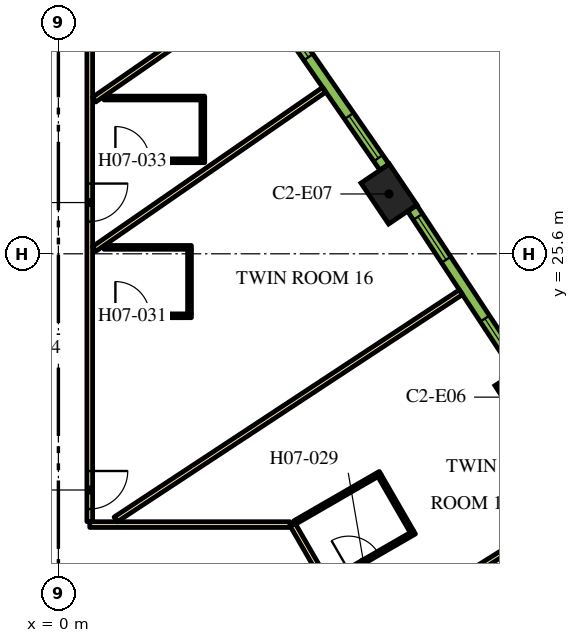
"""IFC4 building model, lengths in metres.
Left out: names, types, materials, properties, quantities, classifications, styles, units other than length and angle.
Written with IfcOpenShell. Run it as: python <this file> out.ifc"""

import sys

from ifc_helpers import new_model, si_unit, direction, frame, frame_2d, origin, origin_2d, place, context, subcontext, project, spatial, rectangle, extrude, element, fill, save


model = new_model("IFC4")
c1 = context("Model", 3, precision=1e-05, world=origin(), true_north=direction((0.0, 1.0)))
c2 = subcontext(c1, "Body", "Model", "MODEL_VIEW")
j1 = project(units=[si_unit("LENGTHUNIT", "METRE"), si_unit("PLANEANGLEUNIT", "RADIAN")], contexts=[c1])
p1 = place(None, origin())
s1 = spatial("IfcSite", under=j1, at=p1, CompositionType="ELEMENT")
p2 = place(p1, origin())
s2 = spatial("IfcBuilding", under=s1, at=p2, CompositionType="ELEMENT")
p3 = place(p2, frame((0.0, 0.0, 99.3)))
s3 = spatial("IfcBuildingStorey", under=s2, at=p3, CompositionType="ELEMENT", Elevation=99.3)
for number, where, z_axis, x_axis in (
    (1, (12.217, 21.828, 0.0), (0.0, 0.0, 1.0), (-0.54, 0.842, 0.0)),
    (2, (8.699, 27.174, 0.0), (0.0, 0.0, 1.0), (-0.559, 0.829, 0.0)),
):
    element("IfcColumn", number, at=place(p3, frame(where, z_axis=z_axis, x_axis=x_axis)), inside=s3, PredefinedType="COLUMN", context=c2, shape_type="SweptSolid", body=[
        extrude(rectangle(XDim=1.3, YDim=0.9, at=origin_2d()), origin(), (0.0, 0.0, 1.0), 3.9),
    ])
p4 = place(p3, frame((6.163, 18.475, 0.0), z_axis=(0.0, 0.0, 1.0), x_axis=(0.500001317485, -0.866024643133, 0.0)))
e3 = element("IfcWall", 3, at=p4, inside=s3, PredefinedType="PARTITIONING", context=c2, shape_type="SweptSolid", body=[
    extrude(rectangle(XDim=25.767, YDim=0.15, at=frame_2d((12.883, 0.0))), origin(), (0.0, 0.0, 1.0), 2.75),
])
p5 = place(p4, frame((24.241, 0.0, 0.0)))
e4 = element("IfcOpeningElement", 4, at=p5, cuts=e3, PredefinedType="OPENING", context=c2, shape_type="SweptSolid", body=[
    extrude(rectangle(XDim=1.0, YDim=2.1, at=frame_2d((0.5, 1.05))), frame((0.0, 0.085, 0.0), z_axis=(0.0, -1.0, 0.0), x_axis=(1.0, 0.0, 0.0)), (0.0, 0.0, 1.0), 0.17),
])
p6 = place(p4, frame((13.144, 0.0, 0.0)))
e5 = element("IfcOpeningElement", 5, at=p6, cuts=e3, PredefinedType="OPENING", context=c2, shape_type="SweptSolid", body=[
    extrude(rectangle(XDim=1.0, YDim=2.1, at=frame_2d((0.5, 1.05))), frame((0.0, 0.085, 0.0), z_axis=(0.0, -1.0, 0.0), x_axis=(1.0, 0.0, 0.0)), (0.0, 0.0, 1.0), 0.17),
])
p7 = place(p4, frame((11.592, 0.0, 0.0)))
e6 = element("IfcOpeningElement", 6, at=p7, cuts=e3, PredefinedType="OPENING", context=c2, shape_type="SweptSolid", body=[
    extrude(rectangle(XDim=1.1, YDim=2.1, at=frame_2d((0.55, 1.05))), frame((0.0, 0.085, 0.0), z_axis=(0.0, -1.0, 0.0), x_axis=(1.0, 0.0, 0.0)), (0.0, 0.0, 1.0), 0.17),
])
p8 = place(p4, frame((4.674, 0.0, 0.0)))
e7 = element("IfcOpeningElement", 7, at=p8, cuts=e3, PredefinedType="OPENING", context=c2, shape_type="SweptSolid", body=[
    extrude(rectangle(XDim=0.9, YDim=2.1, at=frame_2d((0.45, 1.05))), frame((0.0, 0.085, 0.0), z_axis=(0.0, -1.0, 0.0), x_axis=(1.0, 0.0, 0.0)), (0.0, 0.0, 1.0), 0.17),
])
p9 = place(p4, frame((2.411, 0.0, 0.0)))
e8 = element("IfcOpeningElement", 8, at=p9, cuts=e3, PredefinedType="OPENING", context=c2, shape_type="SweptSolid", body=[
    extrude(rectangle(XDim=1.0, YDim=2.1, at=frame_2d((0.5, 1.05))), frame((0.0, 0.085, 0.0), z_axis=(0.0, -1.0, 0.0), x_axis=(1.0, 0.0, 0.0)), (0.0, 0.0, 1.0), 0.17),
])
p10 = place(p3, frame((0.825, 18.475, 0.0), z_axis=(0.0, 0.0, 1.0), x_axis=(1.0, 0.0, 0.0)))
e9 = element("IfcWall", 9, at=p10, inside=s3, PredefinedType="PARTITIONING", context=c2, shape_type="SweptSolid", body=[
    extrude(rectangle(XDim=5.268, YDim=0.15, at=frame_2d((2.634, 0.0))), origin(), (0.0, 0.0, 1.0), 2.75),
])
p11 = place(p3, frame((0.825, 32.098, 0.0), z_axis=(0.0, 0.0, 1.0), x_axis=(0.0, -1.0, 0.0)))
e10 = element("IfcWall", 10, at=p11, inside=s3, PredefinedType="PARTITIONING", context=c2, shape_type="SweptSolid", body=[
    extrude(rectangle(XDim=13.543, YDim=0.15, at=frame_2d((6.772, 0.0))), origin(), (0.0, 0.0, 1.0), 2.75),
])
p12 = place(p11, frame((12.213, 0.0, 0.0)))
e11 = element("IfcOpeningElement", 11, at=p12, cuts=e10, PredefinedType="OPENING", context=c2, shape_type="SweptSolid", body=[
    extrude(rectangle(XDim=1.0, YDim=2.1, at=frame_2d((0.5, 1.05))), frame((0.0, 0.085, 0.0), z_axis=(0.0, -1.0, 0.0), x_axis=(1.0, 0.0, 0.0)), (0.0, 0.0, 1.0), 0.17),
])
p13 = place(p11, frame((4.65, 0.0, 0.0)))
e12 = element("IfcOpeningElement", 12, at=p13, cuts=e10, PredefinedType="OPENING", context=c2, shape_type="SweptSolid", body=[
    extrude(rectangle(XDim=1.0, YDim=2.1, at=frame_2d((0.5, 1.05))), frame((0.0, 0.085, 0.0), z_axis=(0.0, -1.0, 0.0), x_axis=(1.0, 0.0, 0.0)), (0.0, 0.0, 1.0), 0.17),
])
p14 = place(p3, frame((6.994, 29.917, 0.0), z_axis=(0.0, 0.0, 1.0), x_axis=(-0.822255462494, -0.569118576747, 0.0)))
e13 = element("IfcWall", 13, at=p14, inside=s3, PredefinedType="PARTITIONING", context=c2, shape_type="SweptSolid", body=[
    extrude(rectangle(XDim=7.362, YDim=0.15, at=frame_2d((3.681, 0.0))), origin(), (0.0, 0.0, 1.0), 2.75),
])
p15 = place(p3, frame((10.592, 24.589, 0.0), z_axis=(0.0, 0.0, 1.0), x_axis=(-0.835337323748, -0.549737715236, 0.0)))
e14 = element("IfcWall", 14, at=p15, inside=s3, PredefinedType="PARTITIONING", context=c2, shape_type="SweptSolid", body=[
    extrude(rectangle(XDim=10.875, YDim=0.15, at=frame_2d((5.438, 0.0))), origin(), (0.0, 0.0, 1.0), 2.75),
])
p16 = place(p3, frame((4.649, 32.223, 0.0), z_axis=(0.0, 0.0, 1.0), x_axis=(-0.822262349475, -0.569108626394, 0.0)))
e15 = element("IfcWall", 15, at=p16, inside=s3, PredefinedType="PARTITIONING", context=c2, shape_type="SweptSolid", body=[
    extrude(rectangle(XDim=4.51, YDim=0.15, at=frame_2d((2.255, 0.0))), origin(), (0.0, 0.0, 1.0), 2.75),
])
p17 = place(p3, frame((14.049, 19.2, 0.0), z_axis=(0.0, 0.0, 1.0), x_axis=(-0.847955867271, -0.530066832731, 0.0)))
e16 = element("IfcWall", 16, at=p17, inside=s3, PredefinedType="PARTITIONING", context=c2, shape_type="SweptSolid", body=[
    extrude(rectangle(XDim=7.111, YDim=0.15, at=frame_2d((3.556, 0.0))), origin(), (0.0, 0.0, 1.0), 2.75),
])
p18 = place(p3, frame((7.118, 16.971, 0.0), z_axis=(0.0, 0.0, 1.0), x_axis=(0.866021400173, 0.500006934395, 0.0)))
e17 = element("IfcWall", 17, at=p18, inside=s3, PredefinedType="PARTITIONING", context=c2, shape_type="SweptSolid", body=[
    extrude(rectangle(XDim=2.6, YDim=0.1, at=frame_2d((1.3, 0.0))), origin(), (0.0, 0.0, 1.0), 2.75),
])
p19 = place(p18, frame((0.6, 0.0, 0.0)))
e18 = element("IfcOpeningElement", 18, at=p19, cuts=e17, PredefinedType="OPENING", context=c2, shape_type="SweptSolid", body=[
    extrude(rectangle(XDim=0.9, YDim=2.1, at=frame_2d((0.45, 1.05))), frame((0.0, 0.06, 0.0), z_axis=(0.0, -1.0, 0.0), x_axis=(1.0, 0.0, 0.0)), (0.0, 0.0, 1.0), 0.12),
])
p20 = place(p3, frame((9.302, 18.289, 0.0), z_axis=(0.0, 0.0, 1.0), x_axis=(-0.500062241894, 0.865989465428, 0.0)))
e19 = element("IfcWall", 19, at=p20, inside=s3, PredefinedType="PARTITIONING", context=c2, shape_type="SweptSolid", body=[
    extrude(rectangle(XDim=1.7, YDim=0.1, at=frame_2d((0.85, 0.0))), origin(), (0.0, 0.0, 1.0), 2.75),
])
p21 = place(p3, frame((6.218, 18.53, 0.0), z_axis=(0.0, 0.0, 1.0), x_axis=(0.865997922154, 0.500047596559, 0.0)))
e20 = element("IfcWall", 20, at=p21, inside=s3, PredefinedType="PARTITIONING", context=c2, shape_type="SweptSolid", body=[
    extrude(rectangle(XDim=2.6, YDim=0.1, at=frame_2d((1.3, 0.0))), origin(), (0.0, 0.0, 1.0), 2.75),
])
p22 = place(p3, frame((0.9, 23.969, 0.0), z_axis=(0.0, 0.0, 1.0), x_axis=(1.0, 0.0, 0.0)))
e21 = element("IfcWall", 21, at=p22, inside=s3, PredefinedType="PARTITIONING", context=c2, shape_type="SweptSolid", body=[
    extrude(rectangle(XDim=2.6, YDim=0.1, at=frame_2d((1.3, 0.0))), origin(), (0.0, 0.0, 1.0), 2.75),
])
p23 = place(p22, frame((0.6, 0.0, 0.0)))
e22 = element("IfcOpeningElement", 22, at=p23, cuts=e21, PredefinedType="OPENING", context=c2, shape_type="SweptSolid", body=[
    extrude(rectangle(XDim=0.9, YDim=2.1, at=frame_2d((0.45, 1.05))), frame((0.0, 0.06, 0.0), z_axis=(0.0, -1.0, 0.0), x_axis=(1.0, 0.0, 0.0)), (0.0, 0.0, 1.0), 0.12),
])
p24 = place(p3, frame((3.45, 24.019, 0.0), z_axis=(0.0, 0.0, 1.0), x_axis=(0.0, 1.0, 0.0)))
e23 = element("IfcWall", 23, at=p24, inside=s3, PredefinedType="PARTITIONING", context=c2, shape_type="SweptSolid", body=[
    extrude(rectangle(XDim=1.7, YDim=0.1, at=frame_2d((0.85, 0.0))), origin(), (0.0, 0.0, 1.0), 2.75),
])
p25 = place(p3, frame((1.2, 25.769, 0.0), z_axis=(0.0, 0.0, 1.0), x_axis=(1.0, 0.0, 0.0)))
e24 = element("IfcWall", 24, at=p25, inside=s3, PredefinedType="PARTITIONING", context=c2, shape_type="SweptSolid", body=[
    extrude(rectangle(XDim=2.3, YDim=0.1, at=frame_2d((1.15, 0.0))), origin(), (0.0, 0.0, 1.0), 2.75),
])
p26 = place(p3, frame((0.9, 28.048, 0.0), z_axis=(0.0, 0.0, 1.0), x_axis=(1.0, 0.0, 0.0)))
e25 = element("IfcWall", 25, at=p26, inside=s3, PredefinedType="PARTITIONING", context=c2, shape_type="SweptSolid", body=[
    extrude(rectangle(XDim=2.95, YDim=0.1, at=frame_2d((1.475, 0.0))), origin(), (0.0, 0.0, 1.0), 2.75),
])
p27 = place(p26, frame((0.6, 0.0, 0.0)))
e26 = element("IfcOpeningElement", 26, at=p27, cuts=e25, PredefinedType="OPENING", context=c2, shape_type="SweptSolid", body=[
    extrude(rectangle(XDim=0.9, YDim=2.1, at=frame_2d((0.45, 1.05))), frame((0.0, 0.06, 0.0), z_axis=(0.0, -1.0, 0.0), x_axis=(1.0, 0.0, 0.0)), (0.0, 0.0, 1.0), 0.12),
])
p28 = place(p3, frame((3.8, 28.098, 0.0), z_axis=(0.0, 0.0, 1.0), x_axis=(0.0, 1.0, 0.0)))
e27 = element("IfcWall", 27, at=p28, inside=s3, PredefinedType="PARTITIONING", context=c2, shape_type="SweptSolid", body=[
    extrude(rectangle(XDim=1.55, YDim=0.1, at=frame_2d((0.775, 0.0))), origin(), (0.0, 0.0, 1.0), 2.75),
])
p29 = place(p3, frame((1.2, 29.698, 0.0), z_axis=(0.0, 0.0, 1.0), x_axis=(1.0, 0.0, 0.0)))
e28 = element("IfcWall", 28, at=p29, inside=s3, PredefinedType="PARTITIONING", context=c2, shape_type="SweptSolid", body=[
    extrude(rectangle(XDim=2.65, YDim=0.1, at=frame_2d((1.325, 0.0))), origin(), (0.0, 0.0, 1.0), 2.75),
])
p30 = place(p3, frame((12.115, 22.539, 0.0), z_axis=(0.0, 0.0, 1.0), x_axis=(-0.549741341923, 0.835334937005, 0.0)))
e29 = element("IfcWall", 29, at=p30, inside=s3, PredefinedType="SOLIDWALL", context=c2, shape_type="SweptSolid", body=[
    extrude(rectangle(XDim=5.1, YDim=0.29, at=frame_2d((2.55, 0.0))), origin(), (0.0, 0.0, 1.0), 3.65),
])
p31 = place(p30, frame((0.273, 0.0, 0.9)))
e30 = element("IfcOpeningElement", 30, at=p31, cuts=e29, PredefinedType="OPENING", context=c2, shape_type="SweptSolid", body=[
    extrude(rectangle(XDim=1.35, YDim=2.15, at=frame_2d((0.675, 1.075))), frame((0.0, 0.155, 0.0), z_axis=(0.0, -1.0, 0.0), x_axis=(1.0, 0.0, 0.0)), (0.0, 0.0, 1.0), 0.31),
])
p32 = place(p30, frame((3.478, 0.0, 0.9)))
e31 = element("IfcOpeningElement", 31, at=p32, cuts=e29, PredefinedType="OPENING", context=c2, shape_type="SweptSolid", body=[
    extrude(rectangle(XDim=1.35, YDim=2.15, at=frame_2d((0.675, 1.075))), frame((0.0, 0.155, 0.0), z_axis=(0.0, -1.0, 0.0), x_axis=(1.0, 0.0, 0.0)), (0.0, 0.0, 1.0), 0.31),
])
p33 = place(p3, frame((8.58, 27.882, 0.0), z_axis=(0.0, 0.0, 1.0), x_axis=(-0.569113019126, 0.822259309136, 0.0)))
e32 = element("IfcWall", 32, at=p33, inside=s3, PredefinedType="SOLIDWALL", context=c2, shape_type="SweptSolid", body=[
    extrude(rectangle(XDim=5.107, YDim=0.29, at=frame_2d((2.553, 0.0))), origin(), (0.0, 0.0, 1.0), 3.65),
])
p34 = place(p33, frame((0.285, 0.0, 0.9)))
e33 = element("IfcOpeningElement", 33, at=p34, cuts=e32, PredefinedType="OPENING", context=c2, shape_type="SweptSolid", body=[
    extrude(rectangle(XDim=1.35, YDim=2.15, at=frame_2d((0.675, 1.075))), frame((0.0, 0.155, 0.0), z_axis=(0.0, -1.0, 0.0), x_axis=(1.0, 0.0, 0.0)), (0.0, 0.0, 1.0), 0.31),
])
p35 = place(p33, frame((3.516, 0.0, 0.9)))
e34 = element("IfcOpeningElement", 34, at=p35, cuts=e32, PredefinedType="OPENING", context=c2, shape_type="SweptSolid", body=[
    extrude(rectangle(XDim=1.35, YDim=2.15, at=frame_2d((0.675, 1.075))), frame((0.0, 0.155, 0.0), z_axis=(0.0, -1.0, 0.0), x_axis=(1.0, 0.0, 0.0)), (0.0, 0.0, 1.0), 0.31),
])
p36 = place(p19, origin())
e35 = element("IfcDoor", 35, at=p36, inside=s3, OperationType="SINGLE_SWING_RIGHT", PredefinedType="DOOR", context=c2, shape_type="SweptSolid", body=[
    extrude(rectangle(XDim=0.9, YDim=2.1, at=frame_2d((0.45, 1.05))), frame((0.0, 0.025, 0.0), z_axis=(0.0, -1.0, 0.0), x_axis=(1.0, 0.0, 0.0)), (0.0, 0.0, 1.0), 0.05),
])
fill(e18, e35)
p37 = place(p12, origin())
e36 = element("IfcDoor", 36, at=p37, inside=s3, OperationType="SINGLE_SWING_RIGHT", PredefinedType="DOOR", context=c2, shape_type="SweptSolid", body=[
    extrude(rectangle(XDim=1.0, YDim=2.1, at=frame_2d((0.5, 1.05))), frame((0.0, 0.025, 0.0), z_axis=(0.0, -1.0, 0.0), x_axis=(1.0, 0.0, 0.0)), (0.0, 0.0, 1.0), 0.05),
])
fill(e11, e36)
p38 = place(p23, origin())
e37 = element("IfcDoor", 37, at=p38, inside=s3, OperationType="SINGLE_SWING_LEFT", PredefinedType="DOOR", context=c2, shape_type="SweptSolid", body=[
    extrude(rectangle(XDim=0.9, YDim=2.1, at=frame_2d((0.45, 1.05))), frame((0.0, 0.025, 0.0), z_axis=(0.0, -1.0, 0.0), x_axis=(1.0, 0.0, 0.0)), (0.0, 0.0, 1.0), 0.05),
])
fill(e22, e37)
p39 = place(p13, origin())
e38 = element("IfcDoor", 38, at=p39, inside=s3, OperationType="SINGLE_SWING_RIGHT", PredefinedType="DOOR", context=c2, shape_type="SweptSolid", body=[
    extrude(rectangle(XDim=1.0, YDim=2.1, at=frame_2d((0.5, 1.05))), frame((0.0, 0.025, 0.0), z_axis=(0.0, -1.0, 0.0), x_axis=(1.0, 0.0, 0.0)), (0.0, 0.0, 1.0), 0.05),
])
fill(e12, e38)
p40 = place(p27, origin())
e39 = element("IfcDoor", 39, at=p40, inside=s3, OperationType="SINGLE_SWING_LEFT", PredefinedType="DOOR", context=c2, shape_type="SweptSolid", body=[
    extrude(rectangle(XDim=0.9, YDim=2.1, at=frame_2d((0.45, 1.05))), frame((0.0, 0.025, 0.0), z_axis=(0.0, -1.0, 0.0), x_axis=(1.0, 0.0, 0.0)), (0.0, 0.0, 1.0), 0.05),
])
fill(e26, e39)
p41 = place(p31, origin())
e40 = element("IfcWindow", 40, at=p41, inside=s3, PartitioningType="DOUBLE_PANEL_VERTICAL", PredefinedType="WINDOW", context=c2, shape_type="SweptSolid", body=[
    extrude(rectangle(XDim=1.35, YDim=2.15, at=frame_2d((0.675, 1.075))), frame((0.0, 0.015, 0.0), z_axis=(0.0, -1.0, 0.0), x_axis=(1.0, 0.0, 0.0)), (0.0, 0.0, 1.0), 0.06),
])
fill(e30, e40)
p42 = place(p32, origin())
e41 = element("IfcWindow", 41, at=p42, inside=s3, PartitioningType="DOUBLE_PANEL_VERTICAL", PredefinedType="WINDOW", context=c2, shape_type="SweptSolid", body=[
    extrude(rectangle(XDim=1.35, YDim=2.15, at=frame_2d((0.675, 1.075))), frame((0.0, 0.015, 0.0), z_axis=(0.0, -1.0, 0.0), x_axis=(1.0, 0.0, 0.0)), (0.0, 0.0, 1.0), 0.06),
])
fill(e31, e41)
p43 = place(p34, origin())
e42 = element("IfcWindow", 42, at=p43, inside=s3, PartitioningType="DOUBLE_PANEL_VERTICAL", PredefinedType="WINDOW", context=c2, shape_type="SweptSolid", body=[
    extrude(rectangle(XDim=1.35, YDim=2.15, at=frame_2d((0.675, 1.075))), frame((0.0, 0.015, 0.0), z_axis=(0.0, -1.0, 0.0), x_axis=(1.0, 0.0, 0.0)), (0.0, 0.0, 1.0), 0.06),
])
fill(e33, e42)
p44 = place(p35, origin())
e43 = element("IfcWindow", 43, at=p44, inside=s3, PartitioningType="DOUBLE_PANEL_VERTICAL", PredefinedType="WINDOW", context=c2, shape_type="SweptSolid", body=[
    extrude(rectangle(XDim=1.35, YDim=2.15, at=frame_2d((0.675, 1.075))), frame((0.0, 0.015, 0.0), z_axis=(0.0, -1.0, 0.0), x_axis=(1.0, 0.0, 0.0)), (0.0, 0.0, 1.0), 0.06),
])
fill(e34, e43)
save(model, sys.argv[1])
